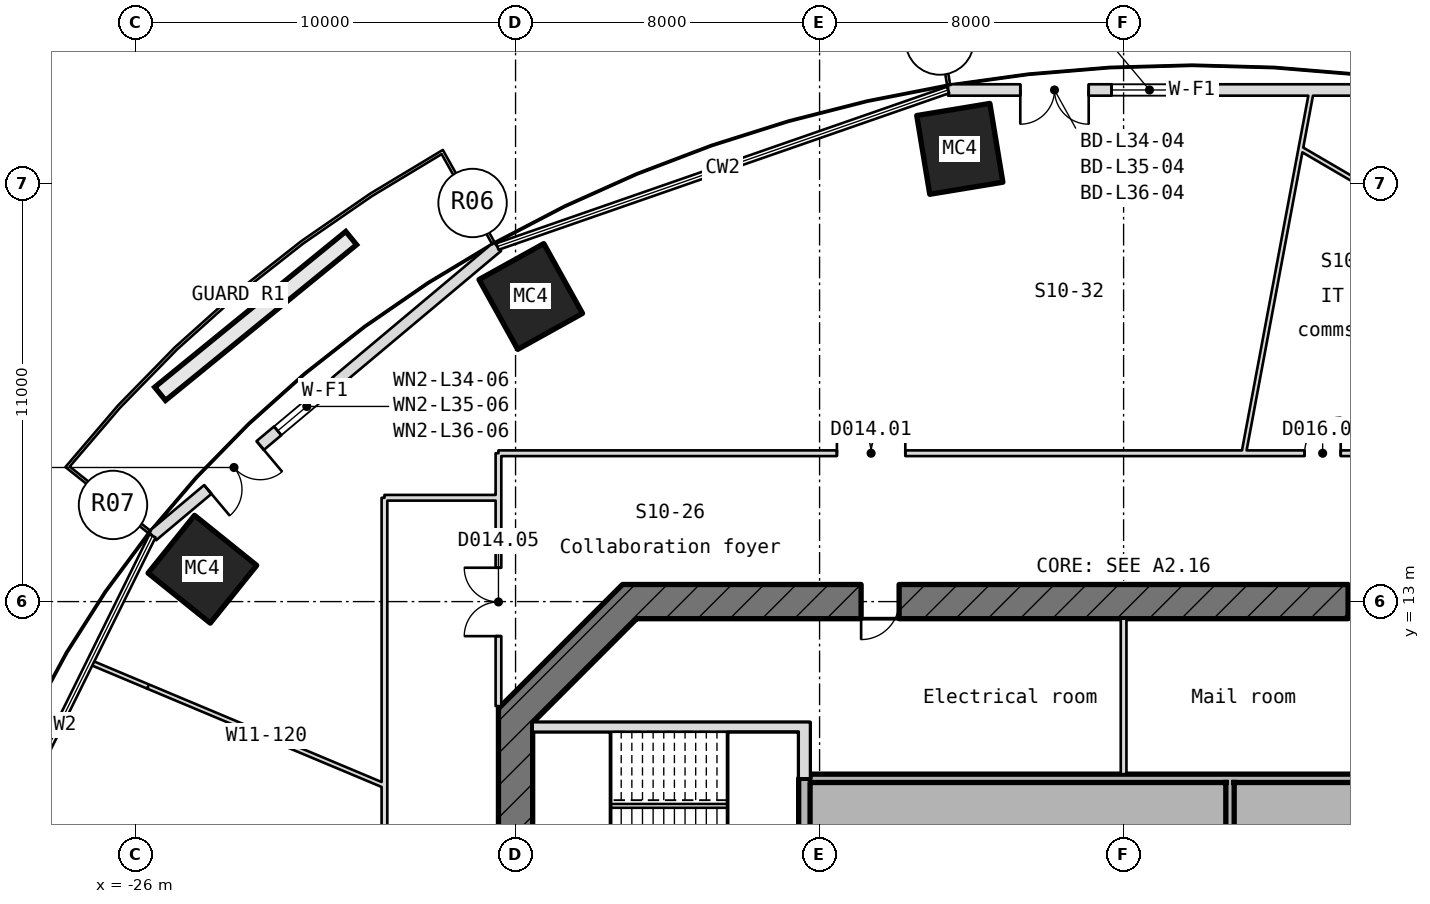
"""IFC4 building model, lengths in metres.
Left out: names, types, materials, properties, quantities, classifications, styles, units other than length and angle.
Written with IfcOpenShell. Run it as: python <this file> out.ifc"""

import sys

from ifc_helpers import new_model, si_unit, direction, frame, frame_2d, origin, origin_2d, place, context, subcontext, project, spatial, rectangle, hollow_rectangle, extrude, element, fill, save


model = new_model("IFC4")
c1 = context("Model", 3, precision=1e-05, world=origin(), true_north=direction((0.0, 1.0)))
c2 = subcontext(c1, "Body", "Model", "MODEL_VIEW")
j1 = project(units=[si_unit("LENGTHUNIT", "METRE"), si_unit("PLANEANGLEUNIT", "RADIAN")], contexts=[c1])
p1 = place(None, origin())
s1 = spatial("IfcSite", under=j1, at=p1, CompositionType="ELEMENT")
p2 = place(p1, origin())
s2 = spatial("IfcBuilding", under=s1, at=p2, CompositionType="ELEMENT")
p3 = place(p2, frame((0.0, 0.0, 161.05)))
s3 = spatial("IfcBuildingStorey", under=s2, at=p3, CompositionType="ELEMENT", Elevation=161.05)
for number, where, z_axis, x_axis in (
    (1, (-4.31, 24.912, -0.18), (0.0, 0.0, 1.0), (0.987, 0.163, 0.0)),
    (2, (-15.6, 21.028, -0.18), (0.0, 0.0, 1.0), (0.874, 0.485, 0.0)),
    (3, (-24.241, 13.852, -0.18), (0.0, 0.0, 1.0), (0.627, 0.779, 0.0)),
):
    element("IfcColumn", number, at=place(p3, frame(where, z_axis=z_axis, x_axis=x_axis)), inside=s3, PredefinedType="COLUMN", context=c2, shape_type="SweptSolid", body=[
        extrude(hollow_rectangle(XDim=1.95, YDim=2.1, WallThickness=0.075, at=origin_2d()), origin(), (0.0, 0.0, 1.0), 4.15),
    ])
p4 = place(p3, frame((8.218, 26.462, 0.0), z_axis=(0.0, 0.0, 1.0), x_axis=(-1.0, 0.0, 0.0)))
e4 = element("IfcWall", 4, at=p4, inside=s3, PredefinedType="SOLIDWALL", context=c2, shape_type="SweptSolid", body=[
    extrude(rectangle(XDim=12.837, YDim=0.3, at=frame_2d((6.418, 0.0))), origin(), (0.0, 0.0, 1.0), 3.97),
])
p5 = place(p4, frame((9.137, 0.0, 0.0)))
e5 = element("IfcOpeningElement", 5, at=p5, cuts=e4, PredefinedType="OPENING", context=c2, shape_type="SweptSolid", body=[
    extrude(rectangle(XDim=1.8, YDim=2.4, at=frame_2d((0.9, 1.2))), frame((0.0, 0.16, 0.0), z_axis=(0.0, -1.0, 0.0), x_axis=(1.0, 0.0, 0.0)), (0.0, 0.0, 1.0), 0.32),
])
p6 = place(p4, frame((6.537, 0.0, 0.9)))
e6 = element("IfcOpeningElement", 6, at=p6, cuts=e4, PredefinedType="OPENING", context=c2, shape_type="SweptSolid", body=[
    extrude(rectangle(XDim=2.0, YDim=1.5, at=frame_2d((1.0, 0.75))), frame((0.0, 0.16, 0.0), z_axis=(0.0, -1.0, 0.0), x_axis=(1.0, 0.0, 0.0)), (0.0, 0.0, 1.0), 0.32),
])
p7 = place(p3, frame((-16.478, 22.342, 0.0), z_axis=(0.0, 0.0, 1.0), x_axis=(-0.766197107622, -0.642605627327, 0.0)))
e7 = element("IfcWall", 7, at=p7, inside=s3, PredefinedType="SOLIDWALL", context=c2, shape_type="SweptSolid", body=[
    extrude(rectangle(XDim=11.846, YDim=0.3, at=frame_2d((5.923, 0.0))), origin(), (0.0, 0.0, 1.0), 3.97),
])
p8 = place(p7, frame((8.146, 0.0, 0.0)))
e8 = element("IfcOpeningElement", 8, at=p8, cuts=e7, PredefinedType="OPENING", context=c2, shape_type="SweptSolid", body=[
    extrude(rectangle(XDim=1.8, YDim=2.4, at=frame_2d((0.9, 1.2))), frame((0.0, 0.16, 0.0), z_axis=(0.0, -1.0, 0.0), x_axis=(1.0, 0.0, 0.0)), (0.0, 0.0, 1.0), 0.32),
])
p9 = place(p7, frame((5.546, 0.0, 0.9)))
e9 = element("IfcOpeningElement", 9, at=p9, cuts=e7, PredefinedType="OPENING", context=c2, shape_type="SweptSolid", body=[
    extrude(rectangle(XDim=2.0, YDim=1.5, at=frame_2d((1.0, 0.75))), frame((0.0, 0.16, 0.0), z_axis=(0.0, -1.0, 0.0), x_axis=(1.0, 0.0, 0.0)), (0.0, 0.0, 1.0), 0.32),
])
p10 = place(p3, frame((13.186, 13.0, -0.18), z_axis=(0.0, 0.0, 1.0), x_axis=(-1.0, 0.0, 0.0)))
e10 = element("IfcWall", 10, at=p10, inside=s3, PredefinedType="SHEAR", context=c2, shape_type="SweptSolid", body=[
    extrude(rectangle(XDim=26.373, YDim=0.9, at=frame_2d((13.186, 0.0))), origin(), (0.0, 0.0, 1.0), 4.15),
])
p11 = place(p10, frame((19.094, 0.0, 0.18)))
e11 = element("IfcOpeningElement", 11, at=p11, cuts=e10, PredefinedType="OPENING", context=c2, shape_type="SweptSolid", body=[
    extrude(rectangle(XDim=1.0, YDim=2.1, at=frame_2d((0.5, 1.05))), frame((0.0, 0.46, 0.0), z_axis=(0.0, -1.0, 0.0), x_axis=(1.0, 0.0, 0.0)), (0.0, 0.0, 1.0), 0.92),
])
p12 = place(p10, frame((6.279, 0.0, 0.18)))
e12 = element("IfcOpeningElement", 12, at=p12, cuts=e10, PredefinedType="OPENING", context=c2, shape_type="SweptSolid", body=[
    extrude(rectangle(XDim=1.0, YDim=2.1, at=frame_2d((0.5, 1.05))), frame((0.0, 0.46, 0.0), z_axis=(0.0, -1.0, 0.0), x_axis=(1.0, 0.0, 0.0)), (0.0, 0.0, 1.0), 0.92),
])
p13 = place(p3, frame((-12.868, 13.132, -0.18), z_axis=(0.0, 0.0, 1.0), x_axis=(-0.707106781187, -0.707106781187, 0.0)))
e13 = element("IfcWall", 13, at=p13, inside=s3, PredefinedType="SHEAR", context=c2, shape_type="SweptSolid", body=[
    extrude(rectangle(XDim=4.615, YDim=0.9, at=frame_2d((2.308, 0.0))), origin(), (0.0, 0.0, 1.0), 4.15),
])
p14 = place(p3, frame((-16.0, 10.186, -0.18), z_axis=(0.0, 0.0, 1.0), x_axis=(0.0, -1.0, 0.0)))
e14 = element("IfcWall", 14, at=p14, inside=s3, PredefinedType="SHEAR", context=c2, shape_type="SweptSolid", body=[
    extrude(rectangle(XDim=20.373, YDim=0.9, at=frame_2d((10.186, 0.0))), origin(), (0.0, 0.0, 1.0), 4.15),
])
p15 = place(p14, frame((8.986, 0.0, 0.18)))
e15 = element("IfcOpeningElement", 15, at=p15, cuts=e14, PredefinedType="OPENING", context=c2, shape_type="SweptSolid", body=[
    extrude(rectangle(XDim=2.4, YDim=2.1, at=frame_2d((1.2, 1.05))), frame((0.0, 0.46, 0.0), z_axis=(0.0, -1.0, 0.0), x_axis=(1.0, 0.0, 0.0)), (0.0, 0.0, 1.0), 0.92),
])
p16 = place(p14, frame((5.586, 0.0, 0.18)))
e16 = element("IfcOpeningElement", 16, at=p16, cuts=e14, PredefinedType="OPENING", context=c2, shape_type="SweptSolid", body=[
    extrude(rectangle(XDim=1.2, YDim=2.1, at=frame_2d((0.6, 1.05))), frame((0.0, 0.46, 0.0), z_axis=(0.0, -1.0, 0.0), x_axis=(1.0, 0.0, 0.0)), (0.0, 0.0, 1.0), 0.92),
])
p17 = place(p3, frame((-8.25, 8.35, 0.0), z_axis=(0.0, 0.0, 1.0), x_axis=(1.0, 0.0, 0.0)))
e17 = element("IfcWall", 17, at=p17, inside=s3, PredefinedType="STANDARD", context=c2, shape_type="SweptSolid", body=[
    extrude(rectangle(XDim=16.5, YDim=0.22, at=frame_2d((8.25, 0.0))), origin(), (0.0, 0.0, 1.0), 3.97),
])
p18 = place(p3, frame((-15.55, 9.7, -0.18), z_axis=(0.0, 0.0, 1.0), x_axis=(1.0, 0.0, 0.0)))
e18 = element("IfcWall", 18, at=p18, inside=s3, PredefinedType="SHEAR", context=c2, shape_type="SweptSolid", body=[
    extrude(rectangle(XDim=7.0, YDim=0.25, at=frame_2d((3.5, 0.0))), origin(), (0.0, 0.0, 1.0), 4.15),
])
p19 = place(p3, frame((-8.4, 5.24, -0.18), z_axis=(0.0, 0.0, 1.0), x_axis=(0.0, 1.0, 0.0)))
e19 = element("IfcWall", 19, at=p19, inside=s3, PredefinedType="SHEAR", context=c2, shape_type="SweptSolid", body=[
    extrude(rectangle(XDim=3.11, YDim=0.3, at=frame_2d((1.555, 0.0))), origin(), (0.0, 0.0, 1.0), 4.15),
])
p20 = place(p3, frame((-8.4, 8.35, -0.18), z_axis=(0.0, 0.0, 1.0), x_axis=(0.0, 1.0, 0.0)))
e20 = element("IfcWall", 20, at=p20, inside=s3, PredefinedType="SHEAR", context=c2, shape_type="SweptSolid", body=[
    extrude(rectangle(XDim=1.475, YDim=0.3, at=frame_2d((0.737, 0.0))), origin(), (0.0, 0.0, 1.0), 4.15),
])
p21 = place(p3, frame((0.0, 8.46, 0.0), z_axis=(0.0, 0.0, 1.0), x_axis=(0.0, 1.0, 0.0)))
e21 = element("IfcWall", 21, at=p21, inside=s3, PredefinedType="PARTITIONING", context=c2, shape_type="SweptSolid", body=[
    extrude(rectangle(XDim=4.09, YDim=0.15, at=frame_2d((2.045, 0.0))), origin(), (0.0, 0.0, 1.0), 3.97),
])
p22 = place(p3, frame((2.8, 5.46, 0.0), z_axis=(0.0, 0.0, 1.0), x_axis=(0.0, 1.0, 0.0)))
e22 = element("IfcWall", 22, at=p22, inside=s3, PredefinedType="STANDARD", context=c2, shape_type="SweptSolid", body=[
    extrude(rectangle(XDim=2.78, YDim=0.22, at=frame_2d((1.39, 0.0))), origin(), (0.0, 0.0, 1.0), 3.97),
])
p23 = place(p3, frame((-19.45, -15.85, 0.0), z_axis=(0.0, 0.0, 1.0), x_axis=(0.0, 1.0, 0.0)))
e23 = element("IfcWall", 23, at=p23, inside=s3, PredefinedType="PARTITIONING", context=c2, shape_type="SweptSolid", body=[
    extrude(rectangle(XDim=31.582, YDim=0.15, at=frame_2d((15.791, 0.0))), origin(), (0.0, 0.0, 1.0), 3.97),
])
p24 = place(p23, frame((14.003, 0.0, 0.0)))
e24 = element("IfcOpeningElement", 24, at=p24, cuts=e23, PredefinedType="OPENING", context=c2, shape_type="SweptSolid", body=[
    extrude(rectangle(XDim=1.8, YDim=2.1, at=frame_2d((0.9, 1.05))), frame((0.0, 0.085, 0.0), z_axis=(0.0, -1.0, 0.0), x_axis=(1.0, 0.0, 0.0)), (0.0, 0.0, 1.0), 0.17),
])
p25 = place(p3, frame((-19.45, 8.156, 0.0), z_axis=(0.0, 0.0, 1.0), x_axis=(-0.922204794335, 0.386701845489, 0.0)))
e25 = element("IfcWall", 25, at=p25, inside=s3, PredefinedType="PARTITIONING", context=c2, shape_type="SweptSolid", body=[
    extrude(rectangle(XDim=6.743, YDim=0.12, at=frame_2d((3.372, 0.0))), origin(), (0.0, 0.0, 1.0), 3.434),
])
p26 = place(p3, frame((-25.669, 10.764, 0.0), z_axis=(0.0, 0.0, 1.0), x_axis=(-0.922189295002, 0.386738806151, 0.0)))
e26 = element("IfcWall", 26, at=p26, inside=s3, PredefinedType="PARTITIONING", context=c2, shape_type="SweptSolid", body=[
    extrude(rectangle(XDim=1.656, YDim=0.12, at=frame_2d((0.828, 0.0))), origin(), (0.0, 0.0, 1.0), 3.97),
])
p27 = place(p3, frame((-19.45, 15.732, 0.0), z_axis=(0.0, 0.0, 1.0), x_axis=(1.0, 0.0, 0.0)))
e27 = element("IfcWall", 27, at=p27, inside=s3, PredefinedType="PARTITIONING", context=c2, shape_type="SweptSolid", body=[
    extrude(rectangle(XDim=3.0, YDim=0.15, at=frame_2d((1.5, 0.0))), origin(), (0.0, 0.0, 1.0), 3.97),
])
p28 = place(p3, frame((-16.45, 10.25, 0.0), z_axis=(0.0, 0.0, 1.0), x_axis=(0.0, 1.0, 0.0)))
e28 = element("IfcWall", 28, at=p28, inside=s3, PredefinedType="PARTITIONING", context=c2, shape_type="SweptSolid", body=[
    extrude(rectangle(XDim=6.654, YDim=0.15, at=frame_2d((3.327, 0.0))), origin(), (0.0, 0.0, 1.0), 3.97),
])
p29 = place(p28, frame((1.841, 0.0, 0.0)))
e29 = element("IfcOpeningElement", 29, at=p29, cuts=e28, PredefinedType="OPENING", context=c2, shape_type="SweptSolid", body=[
    extrude(rectangle(XDim=1.8, YDim=2.1, at=frame_2d((0.9, 1.05))), frame((0.0, 0.085, 0.0), z_axis=(0.0, -1.0, 0.0), x_axis=(1.0, 0.0, 0.0)), (0.0, 0.0, 1.0), 0.17),
])
p30 = place(p3, frame((-16.45, 16.904, 0.0), z_axis=(0.0, 0.0, 1.0), x_axis=(1.0, 0.0, 0.0)))
e30 = element("IfcWall", 30, at=p30, inside=s3, PredefinedType="PARTITIONING", context=c2, shape_type="SweptSolid", body=[
    extrude(rectangle(XDim=32.9, YDim=0.15, at=frame_2d((16.45, 0.0))), origin(), (0.0, 0.0, 1.0), 3.97),
])
p31 = place(p30, frame((30.55, 0.0, 0.0)))
e31 = element("IfcOpeningElement", 31, at=p31, cuts=e30, PredefinedType="OPENING", context=c2, shape_type="SweptSolid", body=[
    extrude(rectangle(XDim=0.95, YDim=2.1, at=frame_2d((0.475, 1.05))), frame((0.0, 0.085, 0.0), z_axis=(0.0, -1.0, 0.0), x_axis=(1.0, 0.0, 0.0)), (0.0, 0.0, 1.0), 0.17),
])
p32 = place(p30, frame((25.983, 0.0, 0.0)))
e32 = element("IfcOpeningElement", 32, at=p32, cuts=e30, PredefinedType="OPENING", context=c2, shape_type="SweptSolid", body=[
    extrude(rectangle(XDim=0.95, YDim=2.1, at=frame_2d((0.475, 1.05))), frame((0.0, 0.085, 0.0), z_axis=(0.0, -1.0, 0.0), x_axis=(1.0, 0.0, 0.0)), (0.0, 0.0, 1.0), 0.17),
])
p33 = place(p30, frame((21.213, 0.0, 0.0)))
e33 = element("IfcOpeningElement", 33, at=p33, cuts=e30, PredefinedType="OPENING", context=c2, shape_type="SweptSolid", body=[
    extrude(rectangle(XDim=0.95, YDim=2.1, at=frame_2d((0.475, 1.05))), frame((0.0, 0.085, 0.0), z_axis=(0.0, -1.0, 0.0), x_axis=(1.0, 0.0, 0.0)), (0.0, 0.0, 1.0), 0.17),
])
p34 = place(p30, frame((8.906, 0.0, 0.0)))
e34 = element("IfcOpeningElement", 34, at=p34, cuts=e30, PredefinedType="OPENING", context=c2, shape_type="SweptSolid", body=[
    extrude(rectangle(XDim=1.8, YDim=2.1, at=frame_2d((0.9, 1.05))), frame((0.0, 0.085, 0.0), z_axis=(0.0, -1.0, 0.0), x_axis=(1.0, 0.0, 0.0)), (0.0, 0.0, 1.0), 0.17),
])
p35 = place(p3, frame((3.162, 16.904, 0.0), z_axis=(0.0, 0.0, 1.0), x_axis=(0.183861029676, 0.982952247958, 0.0)))
e35 = element("IfcWall", 35, at=p35, inside=s3, PredefinedType="PARTITIONING", context=c2, shape_type="SweptSolid", body=[
    extrude(rectangle(XDim=9.724, YDim=0.12, at=frame_2d((4.862, 0.0))), origin(), (0.0, 0.0, 1.0), 3.97),
])
p36 = place(p3, frame((24.206, 13.502, 0.0), z_axis=(0.0, 0.0, 1.0), x_axis=(-0.863538195042, 0.504283437864, 0.0)))
e36 = element("IfcWall", 36, at=p36, inside=s3, PredefinedType="PARTITIONING", context=c2, shape_type="SweptSolid", body=[
    extrude(rectangle(XDim=22.633, YDim=0.12, at=frame_2d((11.317, 0.0))), origin(), (0.0, 0.0, 1.0), 3.97),
])
p37 = place(p5, origin())
e37 = element("IfcDoor", 37, at=p37, inside=s3, OperationType="SINGLE_SWING_LEFT", PredefinedType="DOOR", context=c2, shape_type="SweptSolid", body=[
    extrude(rectangle(XDim=1.8, YDim=2.4, at=frame_2d((0.9, 1.2))), frame((0.0, 0.025, 0.0), z_axis=(0.0, -1.0, 0.0), x_axis=(1.0, 0.0, 0.0)), (0.0, 0.0, 1.0), 0.05),
])
fill(e5, e37)
p38 = place(p6, origin())
e38 = element("IfcWindow", 38, at=p38, inside=s3, PartitioningType="SINGLE_PANEL", PredefinedType="WINDOW", context=c2, shape_type="SweptSolid", body=[
    extrude(rectangle(XDim=2.0, YDim=1.5, at=frame_2d((1.0, 0.75))), frame((0.0, 0.03, 0.0), z_axis=(0.0, -1.0, 0.0), x_axis=(1.0, 0.0, 0.0)), (0.0, 0.0, 1.0), 0.06),
])
fill(e6, e38)
p39 = place(p8, origin())
e39 = element("IfcDoor", 39, at=p39, inside=s3, OperationType="SINGLE_SWING_LEFT", PredefinedType="DOOR", context=c2, shape_type="SweptSolid", body=[
    extrude(rectangle(XDim=1.8, YDim=2.4, at=frame_2d((0.9, 1.2))), frame((0.0, 0.025, 0.0), z_axis=(0.0, -1.0, 0.0), x_axis=(1.0, 0.0, 0.0)), (0.0, 0.0, 1.0), 0.05),
])
fill(e8, e39)
p40 = place(p9, origin())
e40 = element("IfcWindow", 40, at=p40, inside=s3, PartitioningType="SINGLE_PANEL", PredefinedType="WINDOW", context=c2, shape_type="SweptSolid", body=[
    extrude(rectangle(XDim=2.0, YDim=1.5, at=frame_2d((1.0, 0.75))), frame((0.0, 0.03, 0.0), z_axis=(0.0, -1.0, 0.0), x_axis=(1.0, 0.0, 0.0)), (0.0, 0.0, 1.0), 0.06),
])
fill(e9, e40)
p41 = place(p11, origin())
e41 = element("IfcDoor", 41, at=p41, inside=s3, OperationType="SINGLE_SWING_RIGHT", PredefinedType="DOOR", context=c2, shape_type="SweptSolid", body=[
    extrude(rectangle(XDim=1.0, YDim=2.1, at=frame_2d((0.5, 1.05))), frame((0.0, 0.025, 0.0), z_axis=(0.0, -1.0, 0.0), x_axis=(1.0, 0.0, 0.0)), (0.0, 0.0, 1.0), 0.05),
])
fill(e11, e41)
p42 = place(p12, origin())
e42 = element("IfcDoor", 42, at=p42, inside=s3, OperationType="SINGLE_SWING_RIGHT", PredefinedType="DOOR", context=c2, shape_type="SweptSolid", body=[
    extrude(rectangle(XDim=1.0, YDim=2.1, at=frame_2d((0.5, 1.05))), frame((0.0, 0.025, 0.0), z_axis=(0.0, -1.0, 0.0), x_axis=(1.0, 0.0, 0.0)), (0.0, 0.0, 1.0), 0.05),
])
fill(e12, e42)
p43 = place(p33, origin())
e43 = element("IfcDoor", 43, at=p43, inside=s3, OperationType="SINGLE_SWING_RIGHT", PredefinedType="DOOR", context=c2, shape_type="SweptSolid", body=[
    extrude(rectangle(XDim=0.95, YDim=2.1, at=frame_2d((0.475, 1.05))), frame((0.0, 0.025, 0.0), z_axis=(0.0, -1.0, 0.0), x_axis=(1.0, 0.0, 0.0)), (0.0, 0.0, 1.0), 0.05),
])
fill(e33, e43)
p44 = place(p34, origin())
e44 = element("IfcDoor", 44, at=p44, inside=s3, OperationType="DOUBLE_DOOR_SINGLE_SWING", PredefinedType="DOOR", context=c2, shape_type="SweptSolid", body=[
    extrude(rectangle(XDim=1.8, YDim=2.1, at=frame_2d((0.9, 1.05))), frame((0.0, 0.025, 0.0), z_axis=(0.0, -1.0, 0.0), x_axis=(1.0, 0.0, 0.0)), (0.0, 0.0, 1.0), 0.05),
])
fill(e34, e44)
p45 = place(p29, origin())
e45 = element("IfcDoor", 45, at=p45, inside=s3, OperationType="DOUBLE_DOOR_SINGLE_SWING", PredefinedType="DOOR", context=c2, shape_type="SweptSolid", body=[
    extrude(rectangle(XDim=1.8, YDim=2.1, at=frame_2d((0.9, 1.05))), frame((0.0, 0.025, 0.0), z_axis=(0.0, -1.0, 0.0), x_axis=(1.0, 0.0, 0.0)), (0.0, 0.0, 1.0), 0.05),
])
fill(e29, e45)
save(model, sys.argv[1])
